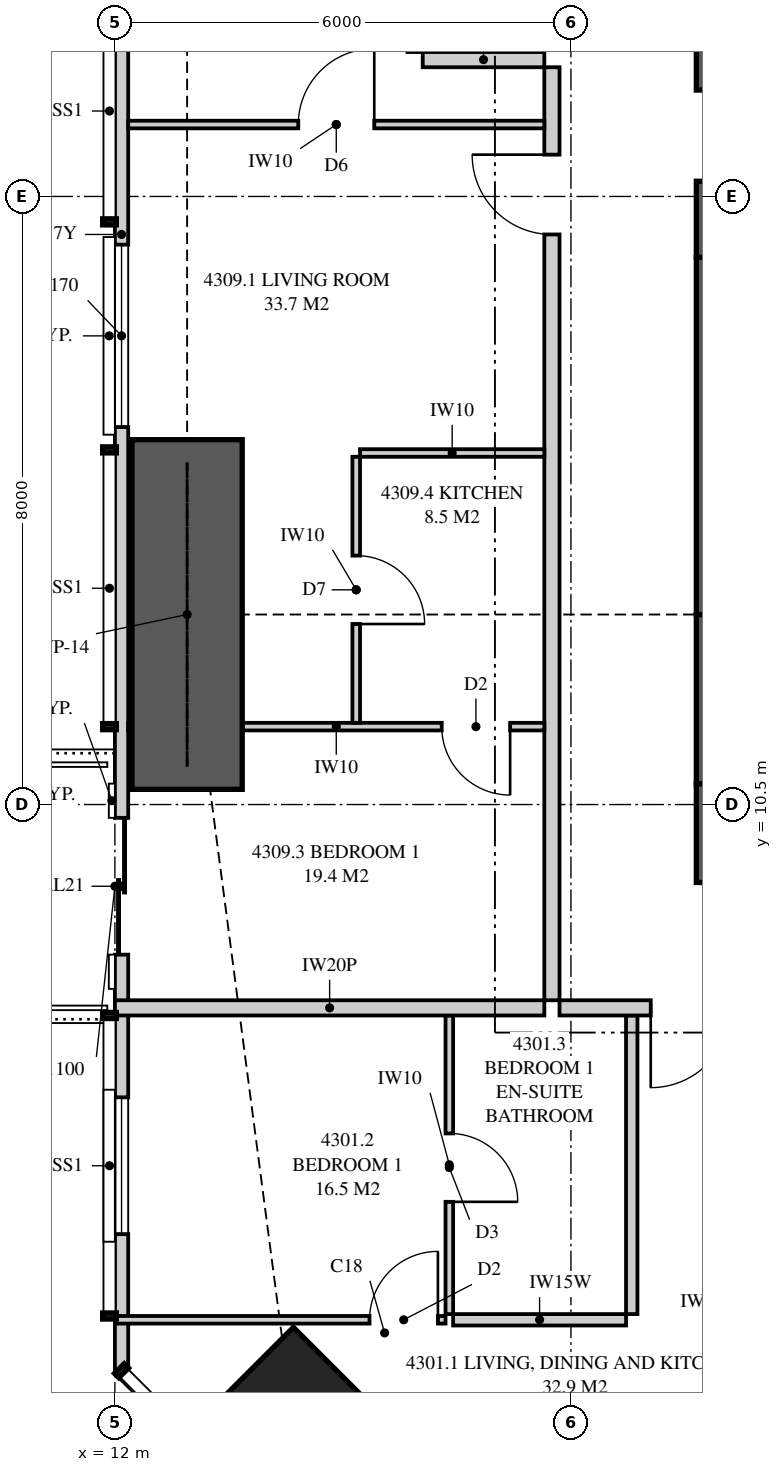
"""IFC4 building model, lengths in metres.
Left out: names, types, materials, properties, quantities, classifications, styles, units other than length and angle.
Written with IfcOpenShell. Run it as: python <this file> out.ifc"""

import sys

from ifc_helpers import new_model, si_unit, direction, frame, frame_2d, origin, origin_2d, place, context, subcontext, project, spatial, polyline, rectangle, outline, extrude, element, fill, save


model = new_model("IFC4")
c1 = context("Model", 3, precision=1e-05, world=origin(), true_north=direction((0.0, 1.0)))
c2 = subcontext(c1, "Body", "Model", "MODEL_VIEW")
j1 = project(units=[si_unit("LENGTHUNIT", "METRE"), si_unit("PLANEANGLEUNIT", "RADIAN")], contexts=[c1])
p1 = place(None, origin())
s1 = spatial("IfcSite", under=j1, at=p1, CompositionType="ELEMENT")
p2 = place(p1, origin())
s2 = spatial("IfcBuilding", under=s1, at=p2, CompositionType="ELEMENT")
p3 = place(p2, frame((0.0, 0.0, 161.05)))
s3 = spatial("IfcBuildingStorey", under=s2, at=p3, CompositionType="ELEMENT", Elevation=161.05)
p4 = place(p3, frame((14.348, 2.348, 0.0), z_axis=(0.0, 0.0, 1.0), x_axis=(0.707106781187, 0.707106781187, 0.0)))
e1 = element("IfcColumn", 1, at=p4, inside=s3, PredefinedType="COLUMN", context=c2, shape_type="SweptSolid", body=[
    extrude(rectangle(XDim=1.8, YDim=1.8, at=origin_2d()), origin(), (0.0, 0.0, 1.0), 3.35),
])
p5 = place(p3, frame((19.65, 10.125, 0.0), z_axis=(0.0, 0.0, 1.0), x_axis=(1.0, 0.0, 0.0)))
e2 = element("IfcWall", 2, at=p5, inside=s3, PredefinedType="SHEAR", context=c2, shape_type="SweptSolid", body=[
    extrude(rectangle(XDim=6.35, YDim=1.3, at=frame_2d((3.175, 0.0))), origin(), (0.0, 0.0, 1.0), 3.35),
])
p6 = place(p5, frame((4.775, 0.0, 0.0)))
e3 = element("IfcOpeningElement", 3, at=p6, cuts=e2, PredefinedType="OPENING", context=c2, shape_type="SweptSolid", body=[
    extrude(rectangle(XDim=0.75, YDim=2.1, at=frame_2d((0.375, 1.05))), frame((0.0, 0.66, 0.0), z_axis=(0.0, -1.0, 0.0), x_axis=(1.0, 0.0, 0.0)), (0.0, 0.0, 1.0), 1.32),
])
p7 = place(p3, frame((20.0, 23.3, 0.0), z_axis=(0.0, 0.0, 1.0), x_axis=(0.0, -1.0, 0.0)))
e4 = element("IfcWall", 4, at=p7, inside=s3, PredefinedType="SHEAR", context=c2, shape_type="SweptSolid", body=[
    extrude(rectangle(XDim=5.6, YDim=0.7, at=frame_2d((2.8, 0.0))), origin(), (0.0, 0.0, 1.0), 3.35),
])
p8 = place(p7, frame((3.4, 0.0, 0.0)))
e5 = element("IfcOpeningElement", 5, at=p8, cuts=e4, PredefinedType="OPENING", context=c2, shape_type="SweptSolid", body=[
    extrude(rectangle(XDim=1.2, YDim=2.2, at=frame_2d((0.6, 1.1))), frame((0.0, 0.36, 0.0), z_axis=(0.0, -1.0, 0.0), x_axis=(1.0, 0.0, 0.0)), (0.0, 0.0, 1.0), 0.72),
])
p9 = place(p3, frame((20.0, 17.7, 0.0), z_axis=(0.0, 0.0, 1.0), x_axis=(0.0, -1.0, 0.0)))
e6 = element("IfcWall", 6, at=p9, inside=s3, PredefinedType="SHEAR", context=c2, shape_type="SweptSolid", body=[
    extrude(rectangle(XDim=4.7, YDim=0.7, at=frame_2d((2.35, 0.0))), origin(), (0.0, 0.0, 1.0), 3.35),
])
p10 = place(p3, frame((20.0, 13.0, 0.0), z_axis=(0.0, 0.0, 1.0), x_axis=(0.0, -1.0, 0.0)))
e7 = element("IfcWall", 7, at=p10, inside=s3, PredefinedType="SHEAR", context=c2, shape_type="SweptSolid", body=[
    extrude(rectangle(XDim=2.225, YDim=0.7, at=frame_2d((1.113, 0.0))), origin(), (0.0, 0.0, 1.0), 3.35),
])
p11 = place(p3, frame((12.087, 32.949, 0.0), z_axis=(0.0, 0.0, 1.0), x_axis=(0.0, -1.0, 0.0)))
e8 = element("IfcWall", 8, at=p11, inside=s3, PredefinedType="SOLIDWALL", context=c2, shape_type="SweptSolid", body=[
    extrude(outline(polyline([(0.0, 0.0), (29.897, 0.0), (29.897, 3.11), (20.191, 3.11), (20.191, 2.15), (20.051, 2.15), (20.051, 3.11), (19.949, 3.11), (19.949, 2.15), (7.949, 2.15), (7.949, 3.11), (7.823, 3.11), (7.823, 2.15), (7.73, 2.15), (7.73, 3.11), (0.0, 3.11), (0.0, 0.0)])), frame((0.0, 0.087, 0.0), z_axis=(0.0, -1.0, 0.0), x_axis=(1.0, 0.0, 0.0)), (0.0, 0.0, 1.0), 0.175),
])
p12 = place(p11, frame((1.297, 0.0, 0.4)))
e9 = element("IfcOpeningElement", 9, at=p12, cuts=e8, PredefinedType="OPENING", context=c2, shape_type="SweptSolid", body=[
    extrude(rectangle(XDim=1.8, YDim=1.7, at=frame_2d((0.9, 0.85))), frame((0.0, 0.097, 0.0), z_axis=(0.0, -1.0, 0.0), x_axis=(1.0, 0.0, 0.0)), (0.0, 0.0, 1.0), 0.195),
])
p13 = place(p11, frame((10.367, 0.0, 0.4)))
e10 = element("IfcOpeningElement", 10, at=p13, cuts=e8, PredefinedType="OPENING", context=c2, shape_type="SweptSolid", body=[
    extrude(rectangle(XDim=1.2, YDim=1.7, at=frame_2d((0.6, 0.85))), frame((0.0, 0.097, 0.0), z_axis=(0.0, -1.0, 0.0), x_axis=(1.0, 0.0, 0.0)), (0.0, 0.0, 1.0), 0.195),
])
p14 = place(p11, frame((15.083, 0.0, 0.4)))
e11 = element("IfcOpeningElement", 11, at=p14, cuts=e8, PredefinedType="OPENING", context=c2, shape_type="SweptSolid", body=[
    extrude(rectangle(XDim=2.4, YDim=1.7, at=frame_2d((1.2, 0.85))), frame((0.0, 0.097, 0.0), z_axis=(0.0, -1.0, 0.0), x_axis=(1.0, 0.0, 0.0)), (0.0, 0.0, 1.0), 0.195),
])
p15 = place(p11, frame((22.624, 0.0, 0.0)))
e12 = element("IfcOpeningElement", 12, at=p15, cuts=e8, PredefinedType="OPENING", context=c2, shape_type="SweptSolid", body=[
    extrude(rectangle(XDim=1.8, YDim=2.1, at=frame_2d((0.9, 1.05))), frame((0.0, 0.097, 0.0), z_axis=(0.0, -1.0, 0.0), x_axis=(1.0, 0.0, 0.0)), (0.0, 0.0, 1.0), 0.195),
])
p16 = place(p11, frame((26.301, 0.0, 0.4)))
e13 = element("IfcOpeningElement", 13, at=p16, cuts=e8, PredefinedType="OPENING", context=c2, shape_type="SweptSolid", body=[
    extrude(rectangle(XDim=1.8, YDim=1.7, at=frame_2d((0.9, 0.85))), frame((0.0, 0.097, 0.0), z_axis=(0.0, -1.0, 0.0), x_axis=(1.0, 0.0, 0.0)), (0.0, 0.0, 1.0), 0.195),
])
p17 = place(p3, frame((17.85, 7.825, 0.0), z_axis=(0.0, 0.0, 1.0), x_axis=(1.0, 0.0, 0.0)))
e14 = element("IfcWall", 14, at=p17, inside=s3, PredefinedType="PARTITIONING", context=c2, shape_type="SweptSolid", body=[
    extrude(rectangle(XDim=2.85, YDim=0.2, at=frame_2d((1.425, 0.0))), origin(), (0.0, 0.0, 1.0), 3.11),
])
p18 = place(p17, frame((1.2, 0.0, 0.0)))
e15 = element("IfcOpeningElement", 15, at=p18, cuts=e14, PredefinedType="OPENING", context=c2, shape_type="SweptSolid", body=[
    extrude(rectangle(XDim=1.05, YDim=2.2, at=frame_2d((0.525, 1.1))), frame((0.0, 0.11, 0.0), z_axis=(0.0, -1.0, 0.0), x_axis=(1.0, 0.0, 0.0)), (0.0, 0.0, 1.0), 0.22),
])
p19 = place(p3, frame((16.4, 3.796, 0.0), z_axis=(0.0, 0.0, 1.0), x_axis=(0.0, 1.0, 0.0)))
e16 = element("IfcWall", 16, at=p19, inside=s3, PredefinedType="PARTITIONING", context=c2, shape_type="SweptSolid", body=[
    extrude(rectangle(XDim=3.929, YDim=0.1, at=frame_2d((1.964, 0.0))), origin(), (0.0, 0.0, 1.0), 3.11),
])
p20 = place(p19, frame((1.477, 0.0, 0.0)))
e17 = element("IfcOpeningElement", 17, at=p20, cuts=e16, PredefinedType="OPENING", context=c2, shape_type="SweptSolid", body=[
    extrude(rectangle(XDim=0.9, YDim=2.1, at=frame_2d((0.45, 1.05))), frame((0.0, 0.06, 0.0), z_axis=(0.0, -1.0, 0.0), x_axis=(1.0, 0.0, 0.0)), (0.0, 0.0, 1.0), 0.12),
])
p21 = place(p3, frame((16.35, 3.721, 0.0), z_axis=(0.0, 0.0, 1.0), x_axis=(-1.0, 0.0, 0.0)))
e18 = element("IfcWall", 18, at=p21, inside=s3, PredefinedType="PARTITIONING", context=c2, shape_type="SweptSolid", body=[
    extrude(outline(polyline([(0.0, 0.0), (4.35, 0.0), (4.35, 3.11), (3.049, 3.11), (3.049, 2.15), (1.314, 2.15), (1.314, 3.11), (0.0, 3.11), (0.0, 0.0)])), frame((0.0, 0.05, 0.0), z_axis=(0.0, -1.0, 0.0), x_axis=(1.0, 0.0, 0.0)), (0.0, 0.0, 1.0), 0.1),
])
p22 = place(p21, frame((0.1, 0.0, 0.0)))
e19 = element("IfcOpeningElement", 19, at=p22, cuts=e18, PredefinedType="OPENING", context=c2, shape_type="SweptSolid", body=[
    extrude(rectangle(XDim=0.9, YDim=2.1, at=frame_2d((0.45, 1.05))), frame((0.0, 0.06, 0.0), z_axis=(0.0, -1.0, 0.0), x_axis=(1.0, 0.0, 0.0)), (0.0, 0.0, 1.0), 0.12),
])
p23 = place(p3, frame((18.725, 3.721, 0.0), z_axis=(0.0, 0.0, 1.0), x_axis=(-1.0, 0.0, 0.0)))
e20 = element("IfcWall", 20, at=p23, inside=s3, PredefinedType="PLUMBINGWALL", context=c2, shape_type="SweptSolid", body=[
    extrude(rectangle(XDim=2.275, YDim=0.15, at=frame_2d((1.138, 0.0))), origin(), (0.0, 0.0, 1.0), 3.11),
])
p24 = place(p3, frame((18.8, 3.796, 0.0), z_axis=(0.0, 0.0, 1.0), x_axis=(0.0, 1.0, 0.0)))
e21 = element("IfcWall", 21, at=p24, inside=s3, PredefinedType="PLUMBINGWALL", context=c2, shape_type="SweptSolid", body=[
    extrude(rectangle(XDim=3.929, YDim=0.15, at=frame_2d((1.964, 0.0))), origin(), (0.0, 0.0, 1.0), 3.11),
])
p25 = place(p3, frame((12.0, 7.825, 0.0), z_axis=(0.0, 0.0, 1.0), x_axis=(1.0, 0.0, 0.0)))
e22 = element("IfcWall", 22, at=p25, inside=s3, PredefinedType="PARTITIONING", context=c2, shape_type="SweptSolid", body=[
    extrude(outline(polyline([(0.0, 0.0), (5.65, 0.0), (5.65, 3.11), (2.547, 3.11), (2.547, 2.15), (0.712, 2.15), (0.712, 3.11), (0.0, 3.11), (0.0, 0.0)])), frame((0.0, 0.1, 0.0), z_axis=(0.0, -1.0, 0.0), x_axis=(1.0, 0.0, 0.0)), (0.0, 0.0, 1.0), 0.2),
])
p26 = place(p3, frame((17.75, 7.925, 0.0), z_axis=(0.0, 0.0, 1.0), x_axis=(0.0, 1.0, 0.0)))
e23 = element("IfcWall", 23, at=p26, inside=s3, PredefinedType="PARTITIONING", context=c2, shape_type="SweptSolid", body=[
    extrude(outline(polyline([(0.0, 0.0), (12.275, 0.0), (12.275, 3.11), (5.412, 3.11), (5.412, 2.541), (4.738, 2.541), (4.738, 3.11), (0.0, 3.11), (0.0, 0.0)])), frame((0.0, 0.1, 0.0), z_axis=(0.0, -1.0, 0.0), x_axis=(1.0, 0.0, 0.0)), (0.0, 0.0, 1.0), 0.2),
])
p27 = place(p26, frame((10.075, 0.0, 0.0)))
e24 = element("IfcOpeningElement", 24, at=p27, cuts=e23, PredefinedType="OPENING", context=c2, shape_type="SweptSolid", body=[
    extrude(rectangle(XDim=1.05, YDim=2.2, at=frame_2d((0.525, 1.1))), frame((0.0, 0.11, 0.0), z_axis=(0.0, -1.0, 0.0), x_axis=(1.0, 0.0, 0.0)), (0.0, 0.0, 1.0), 0.22),
])
p28 = place(p3, frame((12.175, 11.525, 0.0), z_axis=(0.0, 0.0, 1.0), x_axis=(1.0, 0.0, 0.0)))
e25 = element("IfcWall", 25, at=p28, inside=s3, PredefinedType="PARTITIONING", context=c2, shape_type="SweptSolid", body=[
    extrude(outline(polyline([(0.101, 3.11), (0.0, 3.11), (0.0, 0.0), (0.529, 0.0), (0.529, 0.269), (1.021, 0.269), (1.021, 0.0), (5.475, 0.0), (5.475, 3.11), (1.836, 3.11), (1.836, 2.15), (1.021, 2.15), (1.021, 1.881), (0.529, 1.881), (0.529, 2.15), (0.101, 2.15), (0.101, 3.11)])), frame((0.0, 0.05, 0.0), z_axis=(0.0, -1.0, 0.0), x_axis=(1.0, 0.0, 0.0)), (0.0, 0.0, 1.0), 0.1),
])
p29 = place(p28, frame((4.125, 0.0, 0.0)))
e26 = element("IfcOpeningElement", 26, at=p29, cuts=e25, PredefinedType="OPENING", context=c2, shape_type="SweptSolid", body=[
    extrude(rectangle(XDim=0.9, YDim=2.1, at=frame_2d((0.45, 1.05))), frame((0.0, 0.06, 0.0), z_axis=(0.0, -1.0, 0.0), x_axis=(1.0, 0.0, 0.0)), (0.0, 0.0, 1.0), 0.12),
])
p30 = place(p3, frame((15.175, 11.575, 0.0), z_axis=(0.0, 0.0, 1.0), x_axis=(0.0, 1.0, 0.0)))
e27 = element("IfcWall", 27, at=p30, inside=s3, PredefinedType="PARTITIONING", context=c2, shape_type="SweptSolid", body=[
    extrude(outline(polyline([(0.0, 0.0), (3.5, 0.0), (3.5, 3.11), (1.712, 3.11), (1.712, 2.541), (1.138, 2.541), (1.138, 3.11), (0.0, 3.11), (0.0, 0.0)])), frame((0.0, 0.05, 0.0), z_axis=(0.0, -1.0, 0.0), x_axis=(1.0, 0.0, 0.0)), (0.0, 0.0, 1.0), 0.1),
])
p31 = place(p30, frame((1.3, 0.0, 0.0)))
e28 = element("IfcOpeningElement", 28, at=p31, cuts=e27, PredefinedType="OPENING", context=c2, shape_type="SweptSolid", body=[
    extrude(rectangle(XDim=0.9, YDim=2.1, at=frame_2d((0.45, 1.05))), frame((0.0, 0.06, 0.0), z_axis=(0.0, -1.0, 0.0), x_axis=(1.0, 0.0, 0.0)), (0.0, 0.0, 1.0), 0.12),
])
p32 = place(p3, frame((15.225, 15.125, 0.0), z_axis=(0.0, 0.0, 1.0), x_axis=(1.0, 0.0, 0.0)))
e29 = element("IfcWall", 29, at=p32, inside=s3, PredefinedType="PARTITIONING", context=c2, shape_type="SweptSolid", body=[
    extrude(rectangle(XDim=2.425, YDim=0.1, at=frame_2d((1.212, 0.0))), origin(), (0.0, 0.0, 1.0), 3.11),
])
p33 = place(p3, frame((12.175, 19.446, 0.0), z_axis=(0.0, 0.0, 1.0), x_axis=(1.0, 0.0, 0.0)))
e30 = element("IfcWall", 30, at=p33, inside=s3, PredefinedType="PARTITIONING", context=c2, shape_type="SweptSolid", body=[
    extrude(outline(polyline([(0.0, 0.0), (5.475, 0.0), (5.475, 3.11), (1.635, 3.11), (1.635, 2.15), (0.0, 2.15), (0.0, 3.11), (0.0, 0.0)])), frame((0.0, 0.05, 0.0), z_axis=(0.0, -1.0, 0.0), x_axis=(1.0, 0.0, 0.0)), (0.0, 0.0, 1.0), 0.1),
])
p34 = place(p33, frame((2.238, 0.0, 0.0)))
e31 = element("IfcOpeningElement", 31, at=p34, cuts=e30, PredefinedType="OPENING", context=c2, shape_type="SweptSolid", body=[
    extrude(rectangle(XDim=1.0, YDim=2.1, at=frame_2d((0.5, 1.05))), frame((0.0, 0.06, 0.0), z_axis=(0.0, -1.0, 0.0), x_axis=(1.0, 0.0, 0.0)), (0.0, 0.0, 1.0), 0.12),
])
p35 = place(p3, frame((17.65, 20.3, 0.0), z_axis=(0.0, 0.0, 1.0), x_axis=(-1.0, 0.0, 0.0)))
e32 = element("IfcWall", 32, at=p35, inside=s3, PredefinedType="PARTITIONING", context=c2, shape_type="SweptSolid", body=[
    extrude(rectangle(XDim=1.6, YDim=0.2, at=frame_2d((0.8, 0.0))), origin(), (0.0, 0.0, 1.0), 3.11),
])
p36 = place(p3, frame((12.95, 10.7, 0.0), z_axis=(0.0, 0.0, 1.0), x_axis=(0.0, 1.0, 0.0)))
e33 = element("IfcWall", 33, at=p36, inside=s3, PredefinedType="SHEAR", context=c2, shape_type="SweptSolid", body=[
    extrude(rectangle(XDim=4.6, YDim=1.45, at=frame_2d((2.3, 0.0))), origin(), (0.0, 0.0, 1.0), 3.35),
])
p37 = place(p14, origin())
e34 = element("IfcWindow", 34, at=p37, inside=s3, PartitioningType="SINGLE_PANEL", PredefinedType="WINDOW", context=c2, shape_type="SweptSolid", body=[
    extrude(rectangle(XDim=2.4, YDim=1.7, at=frame_2d((1.2, 0.85))), frame((0.0, 0.03, 0.0), z_axis=(0.0, -1.0, 0.0), x_axis=(1.0, 0.0, 0.0)), (0.0, 0.0, 1.0), 0.06),
])
fill(e11, e34)
p38 = place(p15, origin())
e35 = element("IfcDoor", 35, at=p38, inside=s3, OperationType="SLIDING_TO_LEFT", PredefinedType="DOOR", context=c2, shape_type="SweptSolid", body=[
    extrude(rectangle(XDim=1.8, YDim=2.1, at=frame_2d((0.9, 1.05))), frame((0.0, 0.025, 0.0), z_axis=(0.0, -1.0, 0.0), x_axis=(1.0, 0.0, 0.0)), (0.0, 0.0, 1.0), 0.05),
])
fill(e12, e35)
p39 = place(p16, origin())
e36 = element("IfcWindow", 36, at=p39, inside=s3, PartitioningType="SINGLE_PANEL", PredefinedType="WINDOW", context=c2, shape_type="SweptSolid", body=[
    extrude(rectangle(XDim=1.8, YDim=1.7, at=frame_2d((0.9, 0.85))), frame((0.0, 0.03, 0.0), z_axis=(0.0, -1.0, 0.0), x_axis=(1.0, 0.0, 0.0)), (0.0, 0.0, 1.0), 0.06),
])
fill(e13, e36)
p40 = place(p18, frame((1.05, 0.0, 0.0), z_axis=(0.0, 0.0, 1.0), x_axis=(-1.0, 0.0, 0.0)))
e37 = element("IfcDoor", 37, at=p40, inside=s3, OperationType="SINGLE_SWING_RIGHT", PredefinedType="DOOR", context=c2, shape_type="SweptSolid", body=[
    extrude(rectangle(XDim=1.05, YDim=2.2, at=frame_2d((0.525, 1.1))), frame((0.0, 0.025, 0.0), z_axis=(0.0, -1.0, 0.0), x_axis=(1.0, 0.0, 0.0)), (0.0, 0.0, 1.0), 0.05),
])
fill(e15, e37)
p41 = place(p22, frame((0.9, 0.0, 0.0), z_axis=(0.0, 0.0, 1.0), x_axis=(-1.0, 0.0, 0.0)))
e38 = element("IfcDoor", 38, at=p41, inside=s3, OperationType="SINGLE_SWING_RIGHT", PredefinedType="DOOR", context=c2, shape_type="SweptSolid", body=[
    extrude(rectangle(XDim=0.9, YDim=2.1, at=frame_2d((0.45, 1.05))), frame((0.0, 0.025, 0.0), z_axis=(0.0, -1.0, 0.0), x_axis=(1.0, 0.0, 0.0)), (0.0, 0.0, 1.0), 0.05),
])
fill(e19, e38)
p42 = place(p20, frame((0.9, 0.0, 0.0), z_axis=(0.0, 0.0, 1.0), x_axis=(-1.0, 0.0, 0.0)))
e39 = element("IfcDoor", 39, at=p42, inside=s3, OperationType="SINGLE_SWING_RIGHT", PredefinedType="DOOR", context=c2, shape_type="SweptSolid", body=[
    extrude(rectangle(XDim=0.9, YDim=2.1, at=frame_2d((0.45, 1.05))), frame((0.0, 0.025, 0.0), z_axis=(0.0, -1.0, 0.0), x_axis=(1.0, 0.0, 0.0)), (0.0, 0.0, 1.0), 0.05),
])
fill(e17, e39)
p43 = place(p27, origin())
e40 = element("IfcDoor", 40, at=p43, inside=s3, OperationType="SINGLE_SWING_RIGHT", PredefinedType="DOOR", context=c2, shape_type="SweptSolid", body=[
    extrude(rectangle(XDim=1.05, YDim=2.2, at=frame_2d((0.525, 1.1))), frame((0.0, 0.025, 0.0), z_axis=(0.0, -1.0, 0.0), x_axis=(1.0, 0.0, 0.0)), (0.0, 0.0, 1.0), 0.05),
])
fill(e24, e40)
p44 = place(p29, frame((0.9, 0.0, 0.0), z_axis=(0.0, 0.0, 1.0), x_axis=(-1.0, 0.0, 0.0)))
e41 = element("IfcDoor", 41, at=p44, inside=s3, OperationType="SINGLE_SWING_LEFT", PredefinedType="DOOR", context=c2, shape_type="SweptSolid", body=[
    extrude(rectangle(XDim=0.9, YDim=2.1, at=frame_2d((0.45, 1.05))), frame((0.0, 0.025, 0.0), z_axis=(0.0, -1.0, 0.0), x_axis=(1.0, 0.0, 0.0)), (0.0, 0.0, 1.0), 0.05),
])
fill(e26, e41)
p45 = place(p31, frame((0.9, 0.0, 0.0), z_axis=(0.0, 0.0, 1.0), x_axis=(-1.0, 0.0, 0.0)))
e42 = element("IfcDoor", 42, at=p45, inside=s3, OperationType="SINGLE_SWING_RIGHT", PredefinedType="DOOR", context=c2, shape_type="SweptSolid", body=[
    extrude(rectangle(XDim=0.9, YDim=2.1, at=frame_2d((0.45, 1.05))), frame((0.0, 0.025, 0.0), z_axis=(0.0, -1.0, 0.0), x_axis=(1.0, 0.0, 0.0)), (0.0, 0.0, 1.0), 0.05),
])
fill(e28, e42)
p46 = place(p34, origin())
e43 = element("IfcDoor", 43, at=p46, inside=s3, OperationType="SINGLE_SWING_RIGHT", PredefinedType="DOOR", context=c2, shape_type="SweptSolid", body=[
    extrude(rectangle(XDim=1.0, YDim=2.1, at=frame_2d((0.5, 1.05))), frame((0.0, 0.025, 0.0), z_axis=(0.0, -1.0, 0.0), x_axis=(1.0, 0.0, 0.0)), (0.0, 0.0, 1.0), 0.05),
])
fill(e31, e43)
save(model, sys.argv[1])
